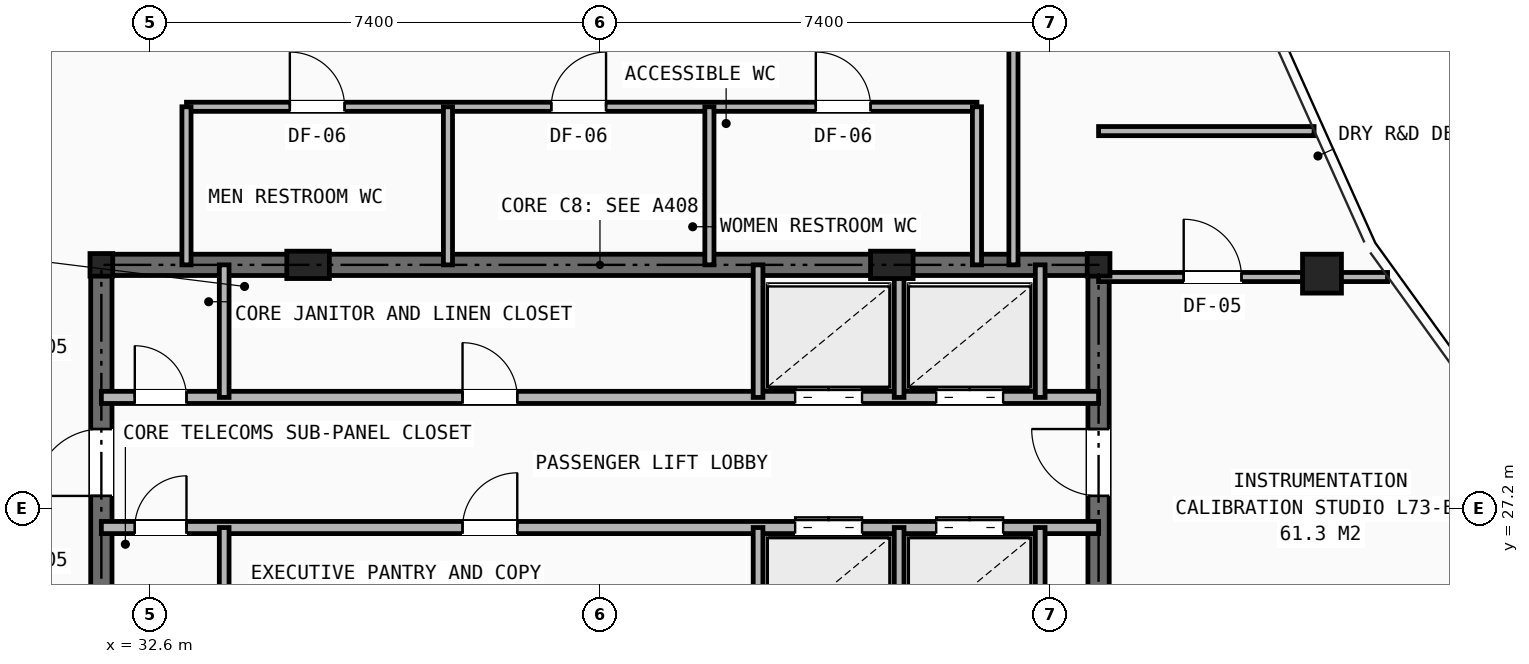
"""IFC4 building model, lengths in metres.
Left out: names, types, materials, properties, quantities, classifications, styles, units other than length and angle.
Written with IfcOpenShell. Run it as: python <this file> out.ifc"""

import sys

from ifc_helpers import new_model, si_unit, direction, frame, frame_2d, origin, origin_2d, place, context, subcontext, project, spatial, rectangle, hollow_rectangle, i_section, extrude, element, fill, save


model = new_model("IFC4")
c1 = context("Model", 3, precision=1e-05, world=origin(), true_north=direction((0.0, 1.0)))
c2 = subcontext(c1, "Body", "Model", "MODEL_VIEW")
j1 = project(units=[si_unit("LENGTHUNIT", "METRE"), si_unit("PLANEANGLEUNIT", "RADIAN")], contexts=[c1])
p1 = place(None, origin())
s1 = spatial("IfcSite", under=j1, at=p1, CompositionType="ELEMENT")
p2 = place(p1, origin())
s2 = spatial("IfcBuilding", under=s1, at=p2, CompositionType="ELEMENT")
p3 = place(p2, frame((0.0, 0.0, 258.5)))
s3 = spatial("IfcBuildingStorey", under=s2, at=p3, CompositionType="ELEMENT", Elevation=258.5)
for number, where, z_axis, x_axis in (
    (1, (31.8, 31.2, 0.0), (0.0, 0.0, 1.0), (1.0, 0.0, 0.0)),
    (2, (48.2, 31.2, 0.0), (0.0, 0.0, 1.0), (1.0, 0.0, 0.0)),
):
    element("IfcColumn", number, at=place(p3, frame(where, z_axis=z_axis, x_axis=x_axis)), inside=s3, PredefinedType="COLUMN", context=c2, shape_type="SweptSolid", body=[
        extrude(i_section(OverallWidth=0.374, OverallDepth=0.372, WebThickness=0.016, FlangeThickness=0.026, at=origin_2d()), origin(), (0.0, 0.0, 1.0), 3.5),
    ])
for number, where, z_axis, x_axis in (
    (3, (35.2, 31.2, 0.0), (0.0, 0.0, 1.0), (1.0, 0.0, 0.0)),
    (4, (44.8, 31.2, 0.0), (0.0, 0.0, 1.0), (1.0, 0.0, 0.0)),
):
    element("IfcColumn", number, at=place(p3, frame(where, z_axis=z_axis, x_axis=x_axis)), inside=s3, PredefinedType="PILASTER", context=c2, shape_type="SweptSolid", body=[
        extrude(rectangle(XDim=0.7, YDim=0.45, at=origin_2d()), origin(), (0.0, 0.0, 1.0), 3.5),
    ])
p4 = place(p3, frame((51.874, 31.056, 0.0), z_axis=(0.0, 0.0, 1.0), x_axis=(1.0, 0.0, 0.0)))
e5 = element("IfcColumn", 5, at=p4, inside=s3, PredefinedType="COLUMN", context=c2, shape_type="SweptSolid", body=[
    extrude(hollow_rectangle(XDim=0.64, YDim=0.64, WallThickness=0.045, at=origin_2d()), origin(), (0.0, 0.0, 1.0), 3.5),
])
p5 = place(p3, frame((31.8, 31.2, 0.0), z_axis=(0.0, 0.0, 1.0), x_axis=(1.0, 0.0, 0.0)))
e6 = element("IfcWall", 6, at=p5, inside=s3, PredefinedType="SHEAR", context=c2, shape_type="SweptSolid", body=[
    extrude(rectangle(XDim=16.4, YDim=0.35, at=frame_2d((8.2, 0.0))), origin(), (0.0, 0.0, 1.0), 3.25),
])
p6 = place(p3, frame((31.8, 16.4, 0.0), z_axis=(0.0, 0.0, 1.0), x_axis=(0.0, 1.0, 0.0)))
e7 = element("IfcWall", 7, at=p6, inside=s3, PredefinedType="SHEAR", context=c2, shape_type="SweptSolid", body=[
    extrude(rectangle(XDim=14.8, YDim=0.35, at=frame_2d((7.4, 0.0))), origin(), (0.0, 0.0, 1.0), 3.25),
])
p7 = place(p6, frame((11.0, 0.0, 0.0)))
e8 = element("IfcOpeningElement", 8, at=p7, cuts=e7, PredefinedType="OPENING", context=c2, shape_type="SweptSolid", body=[
    extrude(rectangle(XDim=1.1, YDim=2.15, at=frame_2d((0.55, 1.075))), frame((0.0, 0.185, 0.0), z_axis=(0.0, -1.0, 0.0), x_axis=(1.0, 0.0, 0.0)), (0.0, 0.0, 1.0), 0.37),
])
p8 = place(p3, frame((48.2, 16.4, 0.0), z_axis=(0.0, 0.0, 1.0), x_axis=(0.0, 1.0, 0.0)))
e9 = element("IfcWall", 9, at=p8, inside=s3, PredefinedType="SHEAR", context=c2, shape_type="SweptSolid", body=[
    extrude(rectangle(XDim=14.8, YDim=0.35, at=frame_2d((7.4, 0.0))), origin(), (0.0, 0.0, 1.0), 3.25),
])
p9 = place(p8, frame((11.0, 0.0, 0.0)))
e10 = element("IfcOpeningElement", 10, at=p9, cuts=e9, PredefinedType="OPENING", context=c2, shape_type="SweptSolid", body=[
    extrude(rectangle(XDim=1.1, YDim=2.15, at=frame_2d((0.55, 1.075))), frame((0.0, 0.185, 0.0), z_axis=(0.0, -1.0, 0.0), x_axis=(1.0, 0.0, 0.0)), (0.0, 0.0, 1.0), 0.37),
])
p10 = place(p3, frame((31.8, 29.02, 0.0), z_axis=(0.0, 0.0, 1.0), x_axis=(1.0, 0.0, 0.0)))
e11 = element("IfcWall", 11, at=p10, inside=s3, PredefinedType="SOLIDWALL", context=c2, shape_type="SweptSolid", body=[
    extrude(rectangle(XDim=16.4, YDim=0.2, at=frame_2d((8.2, 0.0))), origin(), (0.0, 0.0, 1.0), 2.705),
])
p11 = place(p10, frame((0.55, 0.0, 0.0)))
e12 = element("IfcOpeningElement", 12, at=p11, cuts=e11, PredefinedType="OPENING", context=c2, shape_type="SweptSolid", body=[
    extrude(rectangle(XDim=0.85, YDim=2.05, at=frame_2d((0.425, 1.025))), frame((0.0, 0.11, 0.0), z_axis=(0.0, -1.0, 0.0), x_axis=(1.0, 0.0, 0.0)), (0.0, 0.0, 1.0), 0.22),
])
p12 = place(p10, frame((5.94, 0.0, 0.0)))
e13 = element("IfcOpeningElement", 13, at=p12, cuts=e11, PredefinedType="OPENING", context=c2, shape_type="SweptSolid", body=[
    extrude(rectangle(XDim=0.9, YDim=2.1, at=frame_2d((0.45, 1.05))), frame((0.0, 0.11, 0.0), z_axis=(0.0, -1.0, 0.0), x_axis=(1.0, 0.0, 0.0)), (0.0, 0.0, 1.0), 0.22),
])
p13 = place(p10, frame((11.41, 0.0, 0.0)))
e14 = element("IfcOpeningElement", 14, at=p13, cuts=e11, PredefinedType="OPENING", context=c2, shape_type="SweptSolid", body=[
    extrude(rectangle(XDim=1.1, YDim=2.15, at=frame_2d((0.55, 1.075))), frame((0.0, 0.11, 0.0), z_axis=(0.0, -1.0, 0.0), x_axis=(1.0, 0.0, 0.0)), (0.0, 0.0, 1.0), 0.22),
])
p14 = place(p10, frame((13.73, 0.0, 0.0)))
e15 = element("IfcOpeningElement", 15, at=p14, cuts=e11, PredefinedType="OPENING", context=c2, shape_type="SweptSolid", body=[
    extrude(rectangle(XDim=1.1, YDim=2.15, at=frame_2d((0.55, 1.075))), frame((0.0, 0.11, 0.0), z_axis=(0.0, -1.0, 0.0), x_axis=(1.0, 0.0, 0.0)), (0.0, 0.0, 1.0), 0.22),
])
p15 = place(p3, frame((31.8, 26.88, 0.0), z_axis=(0.0, 0.0, 1.0), x_axis=(1.0, 0.0, 0.0)))
e16 = element("IfcWall", 16, at=p15, inside=s3, PredefinedType="SOLIDWALL", context=c2, shape_type="SweptSolid", body=[
    extrude(rectangle(XDim=16.4, YDim=0.2, at=frame_2d((8.2, 0.0))), origin(), (0.0, 0.0, 1.0), 2.705),
])
p16 = place(p15, frame((0.55, 0.0, 0.0)))
e17 = element("IfcOpeningElement", 17, at=p16, cuts=e16, PredefinedType="OPENING", context=c2, shape_type="SweptSolid", body=[
    extrude(rectangle(XDim=0.85, YDim=2.05, at=frame_2d((0.425, 1.025))), frame((0.0, 0.11, 0.0), z_axis=(0.0, -1.0, 0.0), x_axis=(1.0, 0.0, 0.0)), (0.0, 0.0, 1.0), 0.22),
])
p17 = place(p15, frame((5.94, 0.0, 0.0)))
e18 = element("IfcOpeningElement", 18, at=p17, cuts=e16, PredefinedType="OPENING", context=c2, shape_type="SweptSolid", body=[
    extrude(rectangle(XDim=0.9, YDim=2.1, at=frame_2d((0.45, 1.05))), frame((0.0, 0.11, 0.0), z_axis=(0.0, -1.0, 0.0), x_axis=(1.0, 0.0, 0.0)), (0.0, 0.0, 1.0), 0.22),
])
p18 = place(p15, frame((11.41, 0.0, 0.0)))
e19 = element("IfcOpeningElement", 19, at=p18, cuts=e16, PredefinedType="OPENING", context=c2, shape_type="SweptSolid", body=[
    extrude(rectangle(XDim=1.1, YDim=2.15, at=frame_2d((0.55, 1.075))), frame((0.0, 0.11, 0.0), z_axis=(0.0, -1.0, 0.0), x_axis=(1.0, 0.0, 0.0)), (0.0, 0.0, 1.0), 0.22),
])
p19 = place(p15, frame((13.73, 0.0, 0.0)))
e20 = element("IfcOpeningElement", 20, at=p19, cuts=e16, PredefinedType="OPENING", context=c2, shape_type="SweptSolid", body=[
    extrude(rectangle(XDim=1.1, YDim=2.15, at=frame_2d((0.55, 1.075))), frame((0.0, 0.11, 0.0), z_axis=(0.0, -1.0, 0.0), x_axis=(1.0, 0.0, 0.0)), (0.0, 0.0, 1.0), 0.22),
])
p20 = place(p3, frame((33.82, 29.02, 0.0), z_axis=(0.0, 0.0, 1.0), x_axis=(0.0, 1.0, 0.0)))
e21 = element("IfcWall", 21, at=p20, inside=s3, PredefinedType="SOLIDWALL", context=c2, shape_type="SweptSolid", body=[
    extrude(rectangle(XDim=2.18, YDim=0.16, at=frame_2d((1.09, 0.0))), origin(), (0.0, 0.0, 1.0), 2.705),
])
p21 = place(p3, frame((33.82, 24.8, 0.0), z_axis=(0.0, 0.0, 1.0), x_axis=(0.0, 1.0, 0.0)))
e22 = element("IfcWall", 22, at=p21, inside=s3, PredefinedType="SOLIDWALL", context=c2, shape_type="SweptSolid", body=[
    extrude(rectangle(XDim=2.08, YDim=0.16, at=frame_2d((1.04, 0.0))), origin(), (0.0, 0.0, 1.0), 3.25),
])
for number, where, z_axis, x_axis in (
    (23, (42.6, 29.02, 0.0), (0.0, 0.0, 1.0), (0.0, 1.0, 0.0)),
    (24, (44.92, 29.02, 0.0), (0.0, 0.0, 1.0), (0.0, 1.0, 0.0)),
    (25, (47.24, 29.02, 0.0), (0.0, 0.0, 1.0), (0.0, 1.0, 0.0)),
):
    element("IfcWall", number, at=place(p3, frame(where, z_axis=z_axis, x_axis=x_axis)), inside=s3, PredefinedType="SOLIDWALL", context=c2, shape_type="SweptSolid", body=[
        extrude(rectangle(XDim=2.18, YDim=0.16, at=frame_2d((1.09, 0.0))), origin(), (0.0, 0.0, 1.0), 2.705),
    ])
for number, where, z_axis, x_axis in (
    (26, (42.6, 24.8, 0.0), (0.0, 0.0, 1.0), (0.0, 1.0, 0.0)),
    (27, (44.92, 24.8, 0.0), (0.0, 0.0, 1.0), (0.0, 1.0, 0.0)),
    (28, (47.24, 24.8, 0.0), (0.0, 0.0, 1.0), (0.0, 1.0, 0.0)),
):
    element("IfcWall", number, at=place(p3, frame(where, z_axis=z_axis, x_axis=x_axis)), inside=s3, PredefinedType="SOLIDWALL", context=c2, shape_type="SweptSolid", body=[
        extrude(rectangle(XDim=2.08, YDim=0.16, at=frame_2d((1.04, 0.0))), origin(), (0.0, 0.0, 1.0), 3.25),
    ])
p22 = place(p3, frame((33.2, 33.8, 0.0), z_axis=(0.0, 0.0, 1.0), x_axis=(1.0, 0.0, 0.0)))
e29 = element("IfcWall", 29, at=p22, inside=s3, PredefinedType="PARTITIONING", context=c2, shape_type="SweptSolid", body=[
    extrude(rectangle(XDim=13.0, YDim=0.15, at=frame_2d((6.5, 0.0))), origin(), (0.0, 0.0, 1.0), 3.25),
])
p23 = place(p22, frame((1.7, 0.0, 0.0)))
e30 = element("IfcOpeningElement", 30, at=p23, cuts=e29, PredefinedType="OPENING", context=c2, shape_type="SweptSolid", body=[
    extrude(rectangle(XDim=0.9, YDim=2.1, at=frame_2d((0.45, 1.05))), frame((0.0, 0.085, 0.0), z_axis=(0.0, -1.0, 0.0), x_axis=(1.0, 0.0, 0.0)), (0.0, 0.0, 1.0), 0.17),
])
p24 = place(p22, frame((6.0, 0.0, 0.0)))
e31 = element("IfcOpeningElement", 31, at=p24, cuts=e29, PredefinedType="OPENING", context=c2, shape_type="SweptSolid", body=[
    extrude(rectangle(XDim=0.9, YDim=2.1, at=frame_2d((0.45, 1.05))), frame((0.0, 0.085, 0.0), z_axis=(0.0, -1.0, 0.0), x_axis=(1.0, 0.0, 0.0)), (0.0, 0.0, 1.0), 0.17),
])
p25 = place(p22, frame((10.35, 0.0, 0.0)))
e32 = element("IfcOpeningElement", 32, at=p25, cuts=e29, PredefinedType="OPENING", context=c2, shape_type="SweptSolid", body=[
    extrude(rectangle(XDim=0.9, YDim=2.1, at=frame_2d((0.45, 1.05))), frame((0.0, 0.085, 0.0), z_axis=(0.0, -1.0, 0.0), x_axis=(1.0, 0.0, 0.0)), (0.0, 0.0, 1.0), 0.17),
])
for number, where, z_axis, x_axis in (
    (33, (33.2, 31.2, 0.0), (0.0, 0.0, 1.0), (0.0, 1.0, 0.0)),
    (34, (46.2, 31.2, 0.0), (0.0, 0.0, 1.0), (0.0, 1.0, 0.0)),
    (35, (37.5, 31.2, 0.0), (0.0, 0.0, 1.0), (0.0, 1.0, 0.0)),
    (36, (41.8, 31.2, 0.0), (0.0, 0.0, 1.0), (0.0, 1.0, 0.0)),
):
    element("IfcWall", number, at=place(p3, frame(where, z_axis=z_axis, x_axis=x_axis)), inside=s3, PredefinedType="PARTITIONING", context=c2, shape_type="SweptSolid", body=[
        extrude(rectangle(XDim=2.6, YDim=0.15, at=frame_2d((1.3, 0.0))), origin(), (0.0, 0.0, 1.0), 2.705),
    ])
p26 = place(p3, frame((46.8, 31.2, 0.0), z_axis=(0.0, 0.0, 1.0), x_axis=(0.0, 1.0, 0.0)))
e37 = element("IfcWall", 37, at=p26, inside=s3, PredefinedType="PARTITIONING", context=c2, shape_type="SweptSolid", body=[
    extrude(rectangle(XDim=4.5, YDim=0.15, at=frame_2d((2.25, 0.0))), origin(), (0.0, 0.0, 1.0), 2.705),
])
p27 = place(p3, frame((48.2, 31.0, 0.0), z_axis=(0.0, 0.0, 1.0), x_axis=(1.0, 0.0, 0.0)))
e38 = element("IfcWall", 38, at=p27, inside=s3, PredefinedType="PARTITIONING", context=c2, shape_type="SweptSolid", body=[
    extrude(rectangle(XDim=4.752, YDim=0.15, at=frame_2d((2.376, 0.0))), origin(), (0.0, 0.0, 1.0), 2.292),
])
p28 = place(p27, frame((1.4, 0.0, 0.0)))
e39 = element("IfcOpeningElement", 39, at=p28, cuts=e38, PredefinedType="OPENING", context=c2, shape_type="SweptSolid", body=[
    extrude(rectangle(XDim=0.95, YDim=2.1, at=frame_2d((0.475, 1.05))), frame((0.0, 0.085, 0.0), z_axis=(0.0, -1.0, 0.0), x_axis=(1.0, 0.0, 0.0)), (0.0, 0.0, 1.0), 0.17),
])
p29 = place(p3, frame((48.2, 33.4, 0.0), z_axis=(0.0, 0.0, 1.0), x_axis=(1.0, 0.0, 0.0)))
e40 = element("IfcWall", 40, at=p29, inside=s3, PredefinedType="PARTITIONING", context=c2, shape_type="SweptSolid", body=[
    extrude(rectangle(XDim=3.544, YDim=0.15, at=frame_2d((1.772, 0.0))), origin(), (0.0, 0.0, 1.0), 2.628),
])
p30 = place(p11, origin())
e41 = element("IfcDoor", 41, at=p30, inside=s3, OperationType="SINGLE_SWING_LEFT", PredefinedType="DOOR", context=c2, shape_type="SweptSolid", body=[
    extrude(rectangle(XDim=0.85, YDim=2.05, at=frame_2d((0.425, 1.025))), frame((0.0, 0.025, 0.0), z_axis=(0.0, -1.0, 0.0), x_axis=(1.0, 0.0, 0.0)), (0.0, 0.0, 1.0), 0.05),
])
fill(e12, e41)
p31 = place(p16, origin())
e42 = element("IfcDoor", 42, at=p31, inside=s3, OperationType="SINGLE_SWING_RIGHT", PredefinedType="DOOR", context=c2, shape_type="SweptSolid", body=[
    extrude(rectangle(XDim=0.85, YDim=2.05, at=frame_2d((0.425, 1.025))), frame((0.0, 0.025, 0.0), z_axis=(0.0, -1.0, 0.0), x_axis=(1.0, 0.0, 0.0)), (0.0, 0.0, 1.0), 0.05),
])
fill(e17, e42)
p32 = place(p7, origin())
e43 = element("IfcDoor", 43, at=p32, inside=s3, OperationType="SINGLE_SWING_LEFT", PredefinedType="DOOR", context=c2, shape_type="SweptSolid", body=[
    extrude(rectangle(XDim=1.1, YDim=2.15, at=frame_2d((0.55, 1.075))), frame((0.0, 0.025, 0.0), z_axis=(0.0, -1.0, 0.0), x_axis=(1.0, 0.0, 0.0)), (0.0, 0.0, 1.0), 0.05),
])
fill(e8, e43)
p33 = place(p9, origin())
e44 = element("IfcDoor", 44, at=p33, inside=s3, OperationType="SINGLE_SWING_RIGHT", PredefinedType="DOOR", context=c2, shape_type="SweptSolid", body=[
    extrude(rectangle(XDim=1.1, YDim=2.15, at=frame_2d((0.55, 1.075))), frame((0.0, 0.025, 0.0), z_axis=(0.0, -1.0, 0.0), x_axis=(1.0, 0.0, 0.0)), (0.0, 0.0, 1.0), 0.05),
])
fill(e10, e44)
p34 = place(p12, origin())
e45 = element("IfcDoor", 45, at=p34, inside=s3, OperationType="SINGLE_SWING_LEFT", PredefinedType="DOOR", context=c2, shape_type="SweptSolid", body=[
    extrude(rectangle(XDim=0.9, YDim=2.1, at=frame_2d((0.45, 1.05))), frame((0.0, 0.025, 0.0), z_axis=(0.0, -1.0, 0.0), x_axis=(1.0, 0.0, 0.0)), (0.0, 0.0, 1.0), 0.05),
])
fill(e13, e45)
p35 = place(p17, origin())
e46 = element("IfcDoor", 46, at=p35, inside=s3, OperationType="SINGLE_SWING_RIGHT", PredefinedType="DOOR", context=c2, shape_type="SweptSolid", body=[
    extrude(rectangle(XDim=0.9, YDim=2.1, at=frame_2d((0.45, 1.05))), frame((0.0, 0.025, 0.0), z_axis=(0.0, -1.0, 0.0), x_axis=(1.0, 0.0, 0.0)), (0.0, 0.0, 1.0), 0.05),
])
fill(e18, e46)
p36 = place(p13, origin())
e47 = element("IfcDoor", 47, at=p36, inside=s3, OperationType="DOUBLE_DOOR_SLIDING", PredefinedType="DOOR", context=c2, shape_type="SweptSolid", body=[
    extrude(rectangle(XDim=1.1, YDim=2.15, at=frame_2d((0.55, 1.075))), frame((0.0, 0.025, 0.0), z_axis=(0.0, -1.0, 0.0), x_axis=(1.0, 0.0, 0.0)), (0.0, 0.0, 1.0), 0.05),
])
fill(e14, e47)
p37 = place(p14, origin())
e48 = element("IfcDoor", 48, at=p37, inside=s3, OperationType="DOUBLE_DOOR_SLIDING", PredefinedType="DOOR", context=c2, shape_type="SweptSolid", body=[
    extrude(rectangle(XDim=1.1, YDim=2.15, at=frame_2d((0.55, 1.075))), frame((0.0, 0.025, 0.0), z_axis=(0.0, -1.0, 0.0), x_axis=(1.0, 0.0, 0.0)), (0.0, 0.0, 1.0), 0.05),
])
fill(e15, e48)
p38 = place(p18, origin())
e49 = element("IfcDoor", 49, at=p38, inside=s3, OperationType="DOUBLE_DOOR_SLIDING", PredefinedType="DOOR", context=c2, shape_type="SweptSolid", body=[
    extrude(rectangle(XDim=1.1, YDim=2.15, at=frame_2d((0.55, 1.075))), frame((0.0, 0.025, 0.0), z_axis=(0.0, -1.0, 0.0), x_axis=(1.0, 0.0, 0.0)), (0.0, 0.0, 1.0), 0.05),
])
fill(e19, e49)
p39 = place(p19, origin())
e50 = element("IfcDoor", 50, at=p39, inside=s3, OperationType="DOUBLE_DOOR_SLIDING", PredefinedType="DOOR", context=c2, shape_type="SweptSolid", body=[
    extrude(rectangle(XDim=1.1, YDim=2.15, at=frame_2d((0.55, 1.075))), frame((0.0, 0.025, 0.0), z_axis=(0.0, -1.0, 0.0), x_axis=(1.0, 0.0, 0.0)), (0.0, 0.0, 1.0), 0.05),
])
fill(e20, e50)
p40 = place(p23, origin())
e51 = element("IfcDoor", 51, at=p40, inside=s3, OperationType="SINGLE_SWING_LEFT", PredefinedType="DOOR", context=c2, shape_type="SweptSolid", body=[
    extrude(rectangle(XDim=0.9, YDim=2.1, at=frame_2d((0.45, 1.05))), frame((0.0, 0.025, 0.0), z_axis=(0.0, -1.0, 0.0), x_axis=(1.0, 0.0, 0.0)), (0.0, 0.0, 1.0), 0.05),
])
fill(e30, e51)
p41 = place(p24, origin())
e52 = element("IfcDoor", 52, at=p41, inside=s3, OperationType="SINGLE_SWING_RIGHT", PredefinedType="DOOR", context=c2, shape_type="SweptSolid", body=[
    extrude(rectangle(XDim=0.9, YDim=2.1, at=frame_2d((0.45, 1.05))), frame((0.0, 0.025, 0.0), z_axis=(0.0, -1.0, 0.0), x_axis=(1.0, 0.0, 0.0)), (0.0, 0.0, 1.0), 0.05),
])
fill(e31, e52)
p42 = place(p25, origin())
e53 = element("IfcDoor", 53, at=p42, inside=s3, OperationType="SINGLE_SWING_LEFT", PredefinedType="DOOR", context=c2, shape_type="SweptSolid", body=[
    extrude(rectangle(XDim=0.9, YDim=2.1, at=frame_2d((0.45, 1.05))), frame((0.0, 0.025, 0.0), z_axis=(0.0, -1.0, 0.0), x_axis=(1.0, 0.0, 0.0)), (0.0, 0.0, 1.0), 0.05),
])
fill(e32, e53)
p43 = place(p28, origin())
e54 = element("IfcDoor", 54, at=p43, inside=s3, OperationType="SINGLE_SWING_LEFT", PredefinedType="DOOR", context=c2, shape_type="SweptSolid", body=[
    extrude(rectangle(XDim=0.95, YDim=2.1, at=frame_2d((0.475, 1.05))), frame((0.0, 0.025, 0.0), z_axis=(0.0, -1.0, 0.0), x_axis=(1.0, 0.0, 0.0)), (0.0, 0.0, 1.0), 0.05),
])
fill(e39, e54)
save(model, sys.argv[1])
